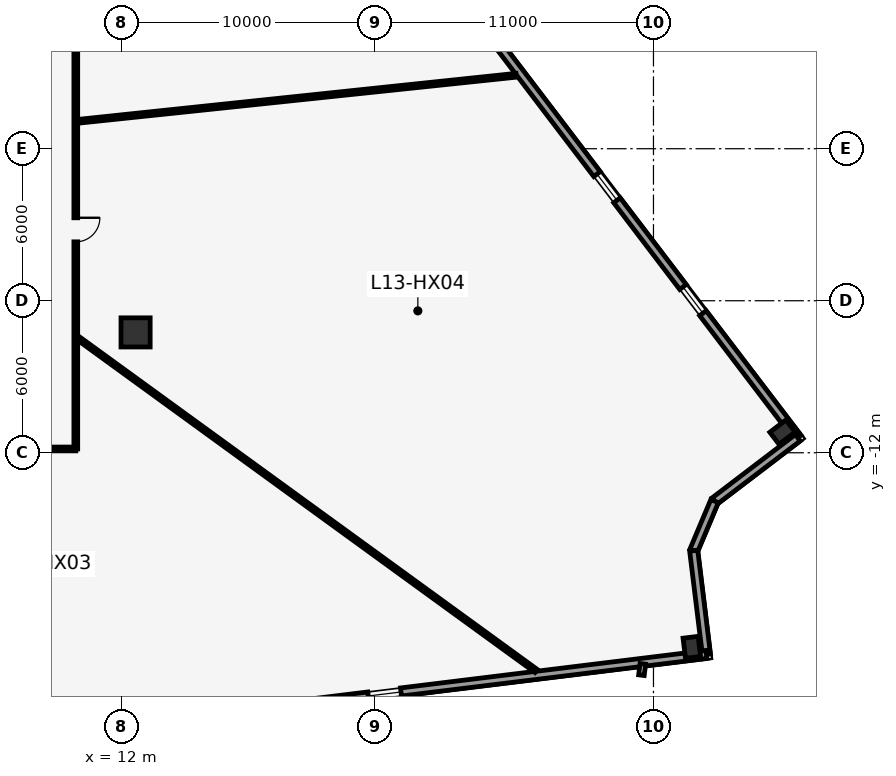
"""IFC4 building model, lengths in metres.
Left out: names, types, materials, properties, quantities, classifications, styles, units other than length and angle.
Written with IfcOpenShell. Run it as: python <this file> out.ifc"""

import sys

from ifc_helpers import new_model, si_unit, direction, frame, frame_2d, origin, origin_2d, place, context, subcontext, project, spatial, rectangle, hollow_rectangle, extrude, element, fill, save


model = new_model("IFC4")
c1 = context("Model", 3, precision=1e-05, world=origin(), true_north=direction((0.0, 1.0)))
c2 = subcontext(c1, "Body", "Model", "MODEL_VIEW")
j1 = project(units=[si_unit("LENGTHUNIT", "METRE"), si_unit("PLANEANGLEUNIT", "RADIAN")], contexts=[c1])
p1 = place(None, origin())
s1 = spatial("IfcSite", under=j1, at=p1, CompositionType="ELEMENT")
p2 = place(p1, origin())
s2 = spatial("IfcBuilding", under=s1, at=p2, CompositionType="ELEMENT")
p3 = place(p2, frame((0.0, 0.0, 62.4)))
s3 = spatial("IfcBuildingStorey", under=s2, at=p3, CompositionType="ELEMENT", Elevation=62.4)
p4 = place(p3, frame((12.56, -7.25, 0.0), z_axis=(0.0, 0.0, 1.0), x_axis=(1.0, 0.0, 0.0)))
e1 = element("IfcColumn", 1, at=p4, inside=s3, PredefinedType="COLUMN", context=c2, shape_type="SweptSolid", body=[
    extrude(rectangle(XDim=1.15, YDim=1.15, at=origin_2d()), origin(), (0.0, 0.0, 1.0), 4.6),
])
for number, where, z_axis, x_axis in (
    (2, (34.514, -19.679, 0.0), (0.0, 0.0, 1.0), (0.993, 0.122, 0.0)),
    (3, (38.093, -11.186, 0.0), (0.0, 0.0, 1.0), (-0.606, 0.795, 0.0)),
):
    element("IfcColumn", number, at=place(p3, frame(where, z_axis=z_axis, x_axis=x_axis)), inside=s3, PredefinedType="COLUMN", context=c2, shape_type="SweptSolid", body=[
        extrude(hollow_rectangle(XDim=0.6, YDim=0.8, WallThickness=0.05, at=origin_2d()), origin(), (0.0, 0.0, 1.0), 4.6),
    ])
p5 = place(p3, frame((-0.115, 39.555, 0.0), z_axis=(0.0, 0.0, 1.0), x_axis=(0.605877389385, -0.795558036243, 0.0)))
e4 = element("IfcWall", 4, at=p5, inside=s3, PredefinedType="STANDARD", context=c2, shape_type="SweptSolid", body=[
    extrude(rectangle(XDim=64.058, YDim=0.32, at=frame_2d((32.029, 0.0))), origin(), (0.0, 0.0, 1.0), 4.35),
])
p6 = place(p5, frame((6.179, 0.0, 0.85)))
e5 = element("IfcOpeningElement", 5, at=p6, cuts=e4, PredefinedType="OPENING", context=c2, shape_type="SweptSolid", body=[
    extrude(rectangle(XDim=1.3, YDim=2.1, at=frame_2d((0.65, 1.05))), frame((0.0, 0.17, 0.0), z_axis=(0.0, -1.0, 0.0), x_axis=(1.0, 0.0, 0.0)), (0.0, 0.0, 1.0), 0.34),
])
p7 = place(p5, frame((11.779, 0.0, 0.85)))
e6 = element("IfcOpeningElement", 6, at=p7, cuts=e4, PredefinedType="OPENING", context=c2, shape_type="SweptSolid", body=[
    extrude(rectangle(XDim=1.3, YDim=2.1, at=frame_2d((0.65, 1.05))), frame((0.0, 0.17, 0.0), z_axis=(0.0, -1.0, 0.0), x_axis=(1.0, 0.0, 0.0)), (0.0, 0.0, 1.0), 0.34),
])
p8 = place(p5, frame((17.379, 0.0, 0.85)))
e7 = element("IfcOpeningElement", 7, at=p8, cuts=e4, PredefinedType="OPENING", context=c2, shape_type="SweptSolid", body=[
    extrude(rectangle(XDim=1.3, YDim=2.1, at=frame_2d((0.65, 1.05))), frame((0.0, 0.17, 0.0), z_axis=(0.0, -1.0, 0.0), x_axis=(1.0, 0.0, 0.0)), (0.0, 0.0, 1.0), 0.34),
])
p9 = place(p5, frame((50.979, 0.0, 0.85)))
e8 = element("IfcOpeningElement", 8, at=p9, cuts=e4, PredefinedType="OPENING", context=c2, shape_type="SweptSolid", body=[
    extrude(rectangle(XDim=1.3, YDim=2.1, at=frame_2d((0.65, 1.05))), frame((0.0, 0.17, 0.0), z_axis=(0.0, -1.0, 0.0), x_axis=(1.0, 0.0, 0.0)), (0.0, 0.0, 1.0), 0.34),
])
p10 = place(p5, frame((56.579, 0.0, 0.85)))
e9 = element("IfcOpeningElement", 9, at=p10, cuts=e4, PredefinedType="OPENING", context=c2, shape_type="SweptSolid", body=[
    extrude(rectangle(XDim=1.3, YDim=2.1, at=frame_2d((0.65, 1.05))), frame((0.0, 0.17, 0.0), z_axis=(0.0, -1.0, 0.0), x_axis=(1.0, 0.0, 0.0)), (0.0, 0.0, 1.0), 0.34),
])
p11 = place(p3, frame((38.696, -11.407, 0.0), z_axis=(0.0, 0.0, 1.0), x_axis=(-0.795549815011, -0.605888184269, 0.0)))
e10 = element("IfcWall", 10, at=p11, inside=s3, PredefinedType="STANDARD", context=c2, shape_type="SweptSolid", body=[
    extrude(rectangle(XDim=4.128, YDim=0.32, at=frame_2d((2.064, 0.0))), origin(), (0.0, 0.0, 1.0), 4.35),
])
p12 = place(p3, frame((35.412, -13.908, 0.0), z_axis=(0.0, 0.0, 1.0), x_axis=(-0.388344964834, -0.921514073841, 0.0)))
e11 = element("IfcWall", 11, at=p12, inside=s3, PredefinedType="STANDARD", context=c2, shape_type="SweptSolid", body=[
    extrude(rectangle(XDim=2.122, YDim=0.32, at=frame_2d((1.061, 0.0))), origin(), (0.0, 0.0, 1.0), 4.35),
])
p13 = place(p3, frame((34.588, -15.864, 0.0), z_axis=(0.0, 0.0, 1.0), x_axis=(0.12182895116, -0.992551110351, 0.0)))
e12 = element("IfcWall", 12, at=p13, inside=s3, PredefinedType="STANDARD", context=c2, shape_type="SweptSolid", body=[
    extrude(rectangle(XDim=4.128, YDim=0.32, at=frame_2d((2.064, 0.0))), origin(), (0.0, 0.0, 1.0), 4.35),
])
p14 = place(p3, frame((35.091, -19.961, 0.0), z_axis=(0.0, 0.0, 1.0), x_axis=(-0.992546286146, -0.121868247946, 0.0)))
e13 = element("IfcWall", 13, at=p14, inside=s3, PredefinedType="STANDARD", context=c2, shape_type="SweptSolid", body=[
    extrude(rectangle(XDim=64.793, YDim=0.32, at=frame_2d((32.396, 0.0))), origin(), (0.0, 0.0, 1.0), 4.35),
])
p15 = place(p14, frame((12.147, 0.0, 0.85)))
e14 = element("IfcOpeningElement", 14, at=p15, cuts=e13, PredefinedType="OPENING", context=c2, shape_type="SweptSolid", body=[
    extrude(rectangle(XDim=1.3, YDim=2.1, at=frame_2d((0.65, 1.05))), frame((0.0, 0.17, 0.0), z_axis=(0.0, -1.0, 0.0), x_axis=(1.0, 0.0, 0.0)), (0.0, 0.0, 1.0), 0.34),
])
p16 = place(p14, frame((17.747, 0.0, 0.85)))
e15 = element("IfcOpeningElement", 15, at=p16, cuts=e13, PredefinedType="OPENING", context=c2, shape_type="SweptSolid", body=[
    extrude(rectangle(XDim=1.3, YDim=2.1, at=frame_2d((0.65, 1.05))), frame((0.0, 0.17, 0.0), z_axis=(0.0, -1.0, 0.0), x_axis=(1.0, 0.0, 0.0)), (0.0, 0.0, 1.0), 0.34),
])
p17 = place(p14, frame((45.747, 0.0, 0.85)))
e16 = element("IfcOpeningElement", 16, at=p17, cuts=e13, PredefinedType="OPENING", context=c2, shape_type="SweptSolid", body=[
    extrude(rectangle(XDim=1.3, YDim=2.1, at=frame_2d((0.65, 1.05))), frame((0.0, 0.17, 0.0), z_axis=(0.0, -1.0, 0.0), x_axis=(1.0, 0.0, 0.0)), (0.0, 0.0, 1.0), 0.34),
])
p18 = place(p14, frame((56.947, 0.0, 0.85)))
e17 = element("IfcOpeningElement", 17, at=p18, cuts=e13, PredefinedType="OPENING", context=c2, shape_type="SweptSolid", body=[
    extrude(rectangle(XDim=1.3, YDim=2.1, at=frame_2d((0.65, 1.05))), frame((0.0, 0.17, 0.0), z_axis=(0.0, -1.0, 0.0), x_axis=(1.0, 0.0, 0.0)), (0.0, 0.0, 1.0), 0.34),
])
p19 = place(p3, frame((10.2, 12.15, 0.0), z_axis=(0.0, 0.0, 1.0), x_axis=(0.0, -1.0, 0.0)))
e18 = element("IfcWall", 18, at=p19, inside=s3, PredefinedType="PARTITIONING", context=c2, shape_type="SweptSolid", body=[
    extrude(rectangle(XDim=24.0, YDim=0.15, at=frame_2d((12.0, 0.0))), origin(), (0.0, 0.0, 1.0), 4.35),
])
p20 = place(p19, frame((14.875, 0.0, 0.0)))
e19 = element("IfcOpeningElement", 19, at=p20, cuts=e18, PredefinedType="OPENING", context=c2, shape_type="SweptSolid", body=[
    extrude(rectangle(XDim=0.95, YDim=2.15, at=frame_2d((0.475, 1.075))), frame((0.0, 0.085, 0.0), z_axis=(0.0, -1.0, 0.0), x_axis=(1.0, 0.0, 0.0)), (0.0, 0.0, 1.0), 0.17),
])
p21 = place(p19, frame((6.154, 0.0, 0.0)))
e20 = element("IfcOpeningElement", 20, at=p21, cuts=e18, PredefinedType="OPENING", context=c2, shape_type="SweptSolid", body=[
    extrude(rectangle(XDim=0.95, YDim=2.15, at=frame_2d((0.475, 1.075))), frame((0.0, 0.085, 0.0), z_axis=(0.0, -1.0, 0.0), x_axis=(1.0, 0.0, 0.0)), (0.0, 0.0, 1.0), 0.17),
])
p22 = place(p3, frame((10.2, -11.85, 0.0), z_axis=(0.0, 0.0, 1.0), x_axis=(-1.0, 0.0, 0.0)))
e21 = element("IfcWall", 21, at=p22, inside=s3, PredefinedType="PARTITIONING", context=c2, shape_type="SweptSolid", body=[
    extrude(rectangle(XDim=20.4, YDim=0.15, at=frame_2d((10.2, 0.0))), origin(), (0.0, 0.0, 1.0), 4.35),
])
p23 = place(p22, frame((12.406, 0.0, 0.0)))
e22 = element("IfcOpeningElement", 22, at=p23, cuts=e21, PredefinedType="OPENING", context=c2, shape_type="SweptSolid", body=[
    extrude(rectangle(XDim=0.95, YDim=2.15, at=frame_2d((0.475, 1.075))), frame((0.0, 0.085, 0.0), z_axis=(0.0, -1.0, 0.0), x_axis=(1.0, 0.0, 0.0)), (0.0, 0.0, 1.0), 0.17),
])
p24 = place(p22, frame((3.701, 0.0, 0.0)))
e23 = element("IfcOpeningElement", 23, at=p24, cuts=e21, PredefinedType="OPENING", context=c2, shape_type="SweptSolid", body=[
    extrude(rectangle(XDim=0.95, YDim=2.15, at=frame_2d((0.475, 1.075))), frame((0.0, 0.085, 0.0), z_axis=(0.0, -1.0, 0.0), x_axis=(1.0, 0.0, 0.0)), (0.0, 0.0, 1.0), 0.17),
])
p25 = place(p3, frame((10.305, 1.083, 0.0), z_axis=(0.0, 0.0, 1.0), x_axis=(0.994521458831, 0.104532616559, 0.0)))
e24 = element("IfcWall", 24, at=p25, inside=s3, PredefinedType="PARTITIONING", context=c2, shape_type="SweptSolid", body=[
    extrude(rectangle(XDim=17.372, YDim=0.15, at=frame_2d((8.686, 0.0))), origin(), (0.0, 0.0, 1.0), 4.35),
])
p26 = place(p3, frame((10.305, -7.487, 0.0), z_axis=(0.0, 0.0, 1.0), x_axis=(0.809018288795, -0.587783470671, 0.0)))
e25 = element("IfcWall", 25, at=p26, inside=s3, PredefinedType="PARTITIONING", context=c2, shape_type="SweptSolid", body=[
    extrude(rectangle(XDim=22.327, YDim=0.15, at=frame_2d((11.163, 0.0))), origin(), (0.0, 0.0, 1.0), 4.35),
])
p27 = place(p9, origin())
e26 = element("IfcWindow", 26, at=p27, inside=s3, PartitioningType="SINGLE_PANEL", PredefinedType="WINDOW", context=c2, shape_type="SweptSolid", body=[
    extrude(rectangle(XDim=1.3, YDim=2.1, at=frame_2d((0.65, 1.05))), frame((0.0, 0.03, 0.0), z_axis=(0.0, -1.0, 0.0), x_axis=(1.0, 0.0, 0.0)), (0.0, 0.0, 1.0), 0.06),
])
fill(e8, e26)
p28 = place(p10, origin())
e27 = element("IfcWindow", 27, at=p28, inside=s3, PartitioningType="SINGLE_PANEL", PredefinedType="WINDOW", context=c2, shape_type="SweptSolid", body=[
    extrude(rectangle(XDim=1.3, YDim=2.1, at=frame_2d((0.65, 1.05))), frame((0.0, 0.03, 0.0), z_axis=(0.0, -1.0, 0.0), x_axis=(1.0, 0.0, 0.0)), (0.0, 0.0, 1.0), 0.06),
])
fill(e9, e27)
p29 = place(p15, origin())
e28 = element("IfcWindow", 28, at=p29, inside=s3, PartitioningType="SINGLE_PANEL", PredefinedType="WINDOW", context=c2, shape_type="SweptSolid", body=[
    extrude(rectangle(XDim=1.3, YDim=2.1, at=frame_2d((0.65, 1.05))), frame((0.0, 0.03, 0.0), z_axis=(0.0, -1.0, 0.0), x_axis=(1.0, 0.0, 0.0)), (0.0, 0.0, 1.0), 0.06),
])
fill(e14, e28)
p30 = place(p20, origin())
e29 = element("IfcDoor", 29, at=p30, inside=s3, OperationType="SINGLE_SWING_LEFT", PredefinedType="DOOR", context=c2, shape_type="SweptSolid", body=[
    extrude(rectangle(XDim=0.95, YDim=2.15, at=frame_2d((0.475, 1.075))), frame((0.0, 0.025, 0.0), z_axis=(0.0, -1.0, 0.0), x_axis=(1.0, 0.0, 0.0)), (0.0, 0.0, 1.0), 0.05),
])
fill(e19, e29)
save(model, sys.argv[1])
